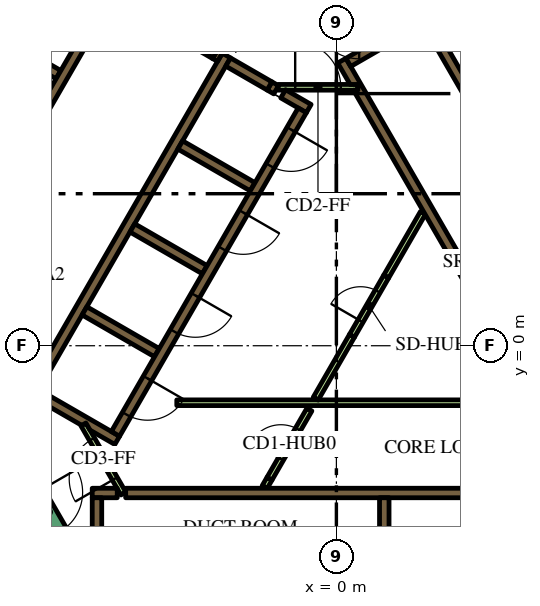
"""IFC4 building model, lengths in metres.
Left out: names, types, materials, properties, quantities, classifications, styles, units other than length and angle.
Written with IfcOpenShell. Run it as: python <this file> out.ifc"""

import sys

from ifc_helpers import new_model, si_unit, direction, frame, frame_2d, origin, place, context, subcontext, project, spatial, polyline, rectangle, outline, extrude, element, fill, save


model = new_model("IFC4")
c1 = context("Model", 3, precision=1e-05, world=origin(), true_north=direction((0.0, 1.0)))
c2 = subcontext(c1, "Body", "Model", "MODEL_VIEW")
j1 = project(units=[si_unit("LENGTHUNIT", "METRE"), si_unit("PLANEANGLEUNIT", "RADIAN")], contexts=[c1])
p1 = place(None, origin())
s1 = spatial("IfcSite", under=j1, at=p1, CompositionType="ELEMENT")
p2 = place(p1, origin())
s2 = spatial("IfcBuilding", under=s1, at=p2, CompositionType="ELEMENT")
p3 = place(p2, frame((0.0, 0.0, 99.3)))
s3 = spatial("IfcBuildingStorey", under=s2, at=p3, CompositionType="ELEMENT", Elevation=99.3)
p4 = place(p3, frame((-15.36, -1.503, 0.0), z_axis=(0.0, 0.0, 1.0), x_axis=(0.50000389221, 0.866023156604, 0.0)))
e1 = element("IfcWall", 1, at=p4, inside=s3, PredefinedType="SOLIDWALL", context=c2, shape_type="SweptSolid", body=[
    extrude(rectangle(XDim=21.0, YDim=0.9, at=frame_2d((10.5, 0.0))), origin(), (0.0, 0.0, 1.0), 3.9),
])
p5 = place(p3, frame((-5.545, -3.875, 0.0), z_axis=(0.0, 0.0, 1.0), x_axis=(1.0, 0.0, 0.0)))
e2 = element("IfcWall", 2, at=p5, inside=s3, PredefinedType="SOLIDWALL", context=c2, shape_type="SweptSolid", body=[
    extrude(rectangle(XDim=11.97, YDim=0.25, at=frame_2d((5.985, 0.0))), origin(), (0.0, 0.0, 1.0), 3.9),
])
p6 = place(p3, frame((-6.425, -3.875, 0.0), z_axis=(0.0, 0.0, 1.0), x_axis=(1.0, 0.0, 0.0)))
e3 = element("IfcWall", 3, at=p6, inside=s3, PredefinedType="SOLIDWALL", context=c2, shape_type="SweptSolid", body=[
    extrude(rectangle(XDim=0.658, YDim=0.25, at=frame_2d((0.329, 0.0))), origin(), (0.0, 0.0, 1.0), 3.9),
])
p7 = place(p3, frame((1.26, -4.0, 0.0), z_axis=(0.0, 0.0, 1.0), x_axis=(0.0, -1.0, 0.0)))
e4 = element("IfcWall", 4, at=p7, inside=s3, PredefinedType="SOLIDWALL", context=c2, shape_type="SweptSolid", body=[
    extrude(rectangle(XDim=2.2, YDim=0.25, at=frame_2d((1.1, 0.0))), origin(), (0.0, 0.0, 1.0), 3.9),
])
p8 = place(p3, frame((-6.3, -4.0, 0.0), z_axis=(0.0, 0.0, 1.0), x_axis=(0.0, -1.0, 0.0)))
e5 = element("IfcWall", 5, at=p8, inside=s3, PredefinedType="SOLIDWALL", context=c2, shape_type="SweptSolid", body=[
    extrude(rectangle(XDim=3.154, YDim=0.25, at=frame_2d((1.577, 0.0))), origin(), (0.0, 0.0, 1.0), 3.9),
])
p9 = place(p3, origin())
e6 = element("IfcWall", 6, at=p9, inside=s3, PredefinedType="SOLIDWALL", context=c2, shape_type="SweptSolid", body=[
    extrude(outline(polyline([(0.566, 6.725), (0.566, 6.875), (0.566, 6.875), (0.565, 6.875), (0.361, 6.875), (0.035, 7.439), (0.252, 7.564), (0.377, 7.348), (6.552, -3.348), (6.677, -3.564), (6.46, -3.689), (0.448, 6.725), (0.565, 6.725), (0.566, 6.725), (0.566, 6.725)])), origin(), (0.0, 0.0, 1.0), 3.9),
])
p10 = place(p3, frame((0.314, 7.456, 0.0), z_axis=(0.0, 0.0, 1.0), x_axis=(0.866013897511, 0.50001992892, 0.0)))
e7 = element("IfcWall", 7, at=p10, inside=s3, PredefinedType="SOLIDWALL", context=c2, shape_type="SweptSolid", body=[
    extrude(rectangle(XDim=3.268, YDim=0.25, at=frame_2d((1.634, 0.0))), origin(), (0.0, 0.0, 1.0), 3.9),
])
p11 = place(p3, frame((-8.06, -1.311, 0.0), z_axis=(0.0, 0.0, 1.0), x_axis=(0.50000273126, 0.866023826885, 0.0)))
e8 = element("IfcWall", 8, at=p11, inside=s3, PredefinedType="SOLIDWALL", context=c2, shape_type="SweptSolid", body=[
    extrude(rectangle(XDim=10.33, YDim=0.25, at=frame_2d((5.165, 0.0))), origin(), (0.0, 0.0, 1.0), 3.9),
])
p12 = place(p3, frame((-1.758, 6.835, 0.0), z_axis=(0.0, 0.0, 1.0), x_axis=(0.865982457891, -0.500074377092, 0.0)))
e9 = element("IfcWall", 9, at=p12, inside=s3, PredefinedType="SOLIDWALL", context=c2, shape_type="SweptSolid", body=[
    extrude(rectangle(XDim=0.2, YDim=0.25, at=frame_2d((0.1, 0.0))), origin(), (0.0, 0.0, 1.0), 3.9),
])
p13 = place(p3, frame((-1.76, 6.836, 0.0), z_axis=(0.0, 0.0, 1.0), x_axis=(-0.865952863304, 0.500125622755, 0.0)))
e10 = element("IfcWall", 10, at=p13, inside=s3, PredefinedType="SOLIDWALL", context=c2, shape_type="SweptSolid", body=[
    extrude(rectangle(XDim=1.258, YDim=0.25, at=frame_2d((0.629, 0.0))), origin(), (0.0, 0.0, 1.0), 3.9),
])
p14 = place(p3, frame((-0.728, 6.24, 0.0), z_axis=(0.0, 0.0, 1.0), x_axis=(-0.865955664968, 0.500120771724, 0.0)))
e11 = element("IfcWall", 11, at=p14, inside=s3, PredefinedType="SOLIDWALL", context=c2, shape_type="SweptSolid", body=[
    extrude(rectangle(XDim=0.778, YDim=0.25, at=frame_2d((0.389, 0.0))), origin(), (0.0, 0.0, 1.0), 3.9),
])
for number, where, z_axis, x_axis in (
    (12, (-2.204, 4.182, 0.0), (0.0, 0.0, 1.0), (-0.866, 0.5, 0.0)),
    (13, (-5.369, 3.1, 0.0), (0.0, 0.0, 1.0), (0.866, -0.5, 0.0)),
    (14, (-4.724, -0.182, 0.0), (0.0, 0.0, 1.0), (-0.866, 0.5, 0.0)),
):
    element("IfcWall", number, at=place(p3, frame(where, z_axis=z_axis, x_axis=x_axis)), inside=s3, PredefinedType="SOLIDWALL", context=c2, shape_type="SweptSolid", body=[
        extrude(rectangle(XDim=2.2, YDim=0.25, at=frame_2d((1.1, 0.0))), origin(), (0.0, 0.0, 1.0), 3.9),
    ])
e15 = element("IfcWall", 15, at=p9, inside=s3, PredefinedType="SOLIDWALL", context=c2, shape_type="SweptSolid", body=[
    extrude(outline(polyline([(-5.922, -2.257), (-5.922, -2.257), (-5.705, -2.382), (-5.83, -2.598), (-6.483, -2.221), (-6.591, -2.033), (-6.591, -2.033), (-6.7, -2.096), (-7.952, -1.373), (-7.827, -1.156), (-5.922, -2.257)])), origin(), (0.0, 0.0, 1.0), 3.9),
])
e16 = element("IfcWall", 16, at=p9, inside=s3, PredefinedType="SOLIDWALL", context=c2, shape_type="SweptSolid", body=[
    extrude(outline(polyline([(-3.128, 7.481), (-3.259, 7.557), (-3.134, 7.773), (-3.003, 7.698), (-3.128, 7.481)])), origin(), (0.0, 0.0, 1.0), 3.9),
])
p15 = place(p3, frame((-7.314, 7.132, 0.0), z_axis=(0.0, 0.0, 1.0), x_axis=(-0.866008176907, 0.50002983664, 0.0)))
e17 = element("IfcWall", 17, at=p15, inside=s3, PredefinedType="SOLIDWALL", context=c2, shape_type="SweptSolid", body=[
    extrude(rectangle(XDim=2.2, YDim=0.25, at=frame_2d((1.1, 0.0))), origin(), (0.0, 0.0, 1.0), 3.9),
])
p16 = place(p3, frame((-1.887, -3.718, 0.0), z_axis=(0.0, 0.0, 1.0), x_axis=(0.500165633897, 0.865929753888, 0.0)))
e18 = element("IfcWall", 18, at=p16, inside=s3, PredefinedType="PARTITIONING", context=c2, shape_type="SweptSolid", body=[
    extrude(rectangle(XDim=0.254, YDim=0.15, at=frame_2d((0.127, 0.0))), origin(), (0.0, 0.0, 1.0), 2.75),
])
p17 = place(p3, frame((-4.2, -1.5, 0.0), z_axis=(0.0, 0.0, 1.0), x_axis=(1.0, 0.0, 0.0)))
e19 = element("IfcWall", 19, at=p17, inside=s3, PredefinedType="PARTITIONING", context=c2, shape_type="SweptSolid", body=[
    extrude(rectangle(XDim=9.359, YDim=0.15, at=frame_2d((4.68, 0.0))), origin(), (0.0, 0.0, 1.0), 2.75),
])
p18 = place(p3, frame((-0.544, -1.393, 0.0), z_axis=(0.0, 0.0, 1.0), x_axis=(0.499928740635, 0.866066541489, 0.0)))
e20 = element("IfcWall", 20, at=p18, inside=s3, PredefinedType="PARTITIONING", context=c2, shape_type="SweptSolid", body=[
    extrude(rectangle(XDim=1.912, YDim=0.15, at=frame_2d((0.956, 0.0))), origin(), (0.0, 0.0, 1.0), 2.75),
])
p19 = place(p3, frame((1.312, 1.822, 0.0), z_axis=(0.0, 0.0, 1.0), x_axis=(0.500003549559, 0.866023354436, 0.0)))
e21 = element("IfcWall", 21, at=p19, inside=s3, PredefinedType="PARTITIONING", context=c2, shape_type="SweptSolid", body=[
    extrude(rectangle(XDim=1.93, YDim=0.15, at=frame_2d((0.965, 0.0))), origin(), (0.0, 0.0, 1.0), 2.75),
])
p20 = place(p3, frame((8.565, -2.185, 0.0), z_axis=(0.0, 0.0, 1.0), x_axis=(-0.499997954832, 0.866026584559, 0.0)))
e22 = element("IfcWall", 22, at=p20, inside=s3, PredefinedType="SOLIDWALL", context=c2, shape_type="SweptSolid", body=[
    extrude(rectangle(XDim=12.35, YDim=0.25, at=frame_2d((6.175, 0.0))), origin(), (0.0, 0.0, 1.0), 3.9),
])
p21 = place(p20, frame((5.725, 0.0, 0.0)))
e23 = element("IfcOpeningElement", 23, at=p21, cuts=e22, PredefinedType="OPENING", context=c2, shape_type="SweptSolid", body=[
    extrude(rectangle(XDim=0.9, YDim=2.1, at=frame_2d((0.45, 1.05))), frame((0.0, 0.135, 0.0), z_axis=(0.0, -1.0, 0.0), x_axis=(1.0, 0.0, 0.0)), (0.0, 0.0, 1.0), 0.27),
])
p22 = place(p3, frame((-6.008, 9.144, 0.0), z_axis=(0.0, 0.0, 1.0), x_axis=(-0.500006956611, -0.866021387346, 0.0)))
e24 = element("IfcWall", 24, at=p22, inside=s3, PredefinedType="SOLIDWALL", context=c2, shape_type="SweptSolid", body=[
    extrude(rectangle(XDim=9.83, YDim=0.25, at=frame_2d((4.915, 0.0))), origin(), (0.0, 0.0, 1.0), 3.9),
])
p23 = place(p22, frame((6.985, 0.0, 0.0)))
e25 = element("IfcOpeningElement", 25, at=p23, cuts=e24, PredefinedType="OPENING", context=c2, shape_type="SweptSolid", body=[
    extrude(rectangle(XDim=0.9, YDim=2.1, at=frame_2d((0.45, 1.05))), frame((0.0, 0.135, 0.0), z_axis=(0.0, -1.0, 0.0), x_axis=(1.0, 0.0, 0.0)), (0.0, 0.0, 1.0), 0.27),
])
p24 = place(p3, frame((-0.898, 6.194, 0.0), z_axis=(0.0, 0.0, 1.0), x_axis=(-0.499996202215, -0.866027596426, 0.0)))
e26 = element("IfcWall", 26, at=p24, inside=s3, PredefinedType="SOLIDWALL", context=c2, shape_type="SweptSolid", body=[
    extrude(rectangle(XDim=9.83, YDim=0.25, at=frame_2d((4.915, 0.0))), origin(), (0.0, 0.0, 1.0), 3.9),
])
p25 = place(p24, frame((0.585, 0.0, 0.0)))
e27 = element("IfcOpeningElement", 27, at=p25, cuts=e26, PredefinedType="OPENING", context=c2, shape_type="SweptSolid", body=[
    extrude(rectangle(XDim=1.1, YDim=2.1, at=frame_2d((0.55, 1.05))), frame((0.0, 0.135, 0.0), z_axis=(0.0, -1.0, 0.0), x_axis=(1.0, 0.0, 0.0)), (0.0, 0.0, 1.0), 0.27),
])
p26 = place(p24, frame((3.105, 0.0, 0.0)))
e28 = element("IfcOpeningElement", 28, at=p26, cuts=e26, PredefinedType="OPENING", context=c2, shape_type="SweptSolid", body=[
    extrude(rectangle(XDim=1.1, YDim=2.1, at=frame_2d((0.55, 1.05))), frame((0.0, 0.135, 0.0), z_axis=(0.0, -1.0, 0.0), x_axis=(1.0, 0.0, 0.0)), (0.0, 0.0, 1.0), 0.27),
])
p27 = place(p24, frame((5.625, 0.0, 0.0)))
e29 = element("IfcOpeningElement", 29, at=p27, cuts=e26, PredefinedType="OPENING", context=c2, shape_type="SweptSolid", body=[
    extrude(rectangle(XDim=1.1, YDim=2.1, at=frame_2d((0.55, 1.05))), frame((0.0, 0.135, 0.0), z_axis=(0.0, -1.0, 0.0), x_axis=(1.0, 0.0, 0.0)), (0.0, 0.0, 1.0), 0.27),
])
p28 = place(p24, frame((8.145, 0.0, 0.0)))
e30 = element("IfcOpeningElement", 30, at=p28, cuts=e26, PredefinedType="OPENING", context=c2, shape_type="SweptSolid", body=[
    extrude(rectangle(XDim=1.1, YDim=2.1, at=frame_2d((0.55, 1.05))), frame((0.0, 0.135, 0.0), z_axis=(0.0, -1.0, 0.0), x_axis=(1.0, 0.0, 0.0)), (0.0, 0.0, 1.0), 0.27),
])
p29 = place(p3, frame((-8.103, -3.466, 0.0), z_axis=(0.0, 0.0, 1.0), x_axis=(0.500078061341, -0.865980330357, 0.0)))
e31 = element("IfcWall", 31, at=p29, inside=s3, PredefinedType="SOLIDWALL", context=c2, shape_type="SweptSolid", body=[
    extrude(rectangle(XDim=2.1, YDim=0.4, at=frame_2d((1.05, 0.0))), origin(), (0.0, 0.0, 1.0), 3.9),
])
p30 = place(p29, frame((0.45, 0.0, 0.0)))
e32 = element("IfcOpeningElement", 32, at=p30, cuts=e31, PredefinedType="OPENING", context=c2, shape_type="SweptSolid", body=[
    extrude(rectangle(XDim=1.2, YDim=2.1, at=frame_2d((0.6, 1.05))), frame((0.0, 0.21, 0.0), z_axis=(0.0, -1.0, 0.0), x_axis=(1.0, 0.0, 0.0)), (0.0, 0.0, 1.0), 0.42),
])
p31 = place(p3, frame((-1.76, -3.498, 0.0), z_axis=(0.0, 0.0, 1.0), x_axis=(0.499977374825, 0.866038466041, 0.0)))
e33 = element("IfcWall", 33, at=p31, inside=s3, PredefinedType="PARTITIONING", context=c2, shape_type="SweptSolid", body=[
    extrude(rectangle(XDim=2.1, YDim=0.15, at=frame_2d((1.05, 0.0))), origin(), (0.0, 0.0, 1.0), 2.75),
])
p32 = place(p31, frame((0.6, 0.0, 0.0)))
e34 = element("IfcOpeningElement", 34, at=p32, cuts=e33, PredefinedType="OPENING", context=c2, shape_type="SweptSolid", body=[
    extrude(rectangle(XDim=0.9, YDim=2.1, at=frame_2d((0.45, 1.05))), frame((0.0, 0.085, 0.0), z_axis=(0.0, -1.0, 0.0), x_axis=(1.0, 0.0, 0.0)), (0.0, 0.0, 1.0), 0.17),
])
p33 = place(p3, frame((-1.534, 6.8, 0.0), z_axis=(0.0, 0.0, 1.0), x_axis=(1.0, 0.0, 0.0)))
e35 = element("IfcWall", 35, at=p33, inside=s3, PredefinedType="PARTITIONING", context=c2, shape_type="SweptSolid", body=[
    extrude(rectangle(XDim=2.1, YDim=0.15, at=frame_2d((1.05, 0.0))), origin(), (0.0, 0.0, 1.0), 2.75),
])
p34 = place(p33, frame((0.45, 0.0, 0.0)))
e36 = element("IfcOpeningElement", 36, at=p34, cuts=e35, PredefinedType="OPENING", context=c2, shape_type="SweptSolid", body=[
    extrude(rectangle(XDim=1.2, YDim=2.1, at=frame_2d((0.6, 1.05))), frame((0.0, 0.085, 0.0), z_axis=(0.0, -1.0, 0.0), x_axis=(1.0, 0.0, 0.0)), (0.0, 0.0, 1.0), 0.17),
])
p35 = place(p3, frame((-5.606, -3.89, 0.0), z_axis=(0.0, 0.0, 1.0), x_axis=(-0.500027713859, 0.866009402589, 0.0)))
e37 = element("IfcWall", 37, at=p35, inside=s3, PredefinedType="PARTITIONING", context=c2, shape_type="SweptSolid", body=[
    extrude(rectangle(XDim=2.1, YDim=0.15, at=frame_2d((1.05, 0.0))), origin(), (0.0, 0.0, 1.0), 2.75),
])
p36 = place(p35, frame((0.45, 0.0, 0.0)))
e38 = element("IfcOpeningElement", 38, at=p36, cuts=e37, PredefinedType="OPENING", context=c2, shape_type="SweptSolid", body=[
    extrude(rectangle(XDim=1.2, YDim=2.1, at=frame_2d((0.6, 1.05))), frame((0.0, 0.085, 0.0), z_axis=(0.0, -1.0, 0.0), x_axis=(1.0, 0.0, 0.0)), (0.0, 0.0, 1.0), 0.17),
])
p37 = place(p3, frame((-4.409, 8.365, 0.0), z_axis=(0.0, 0.0, 1.0), x_axis=(0.866034573852, -0.49998411664, 0.0)))
e39 = element("IfcWall", 39, at=p37, inside=s3, PredefinedType="SOLIDWALL", context=c2, shape_type="SweptSolid", body=[
    extrude(rectangle(XDim=1.4, YDim=0.25, at=frame_2d((0.7, 0.0))), origin(), (0.0, 0.0, 1.0), 3.9),
])
p38 = place(p37, frame((0.1, 0.0, 0.0)))
e40 = element("IfcOpeningElement", 40, at=p38, cuts=e39, PredefinedType="OPENING", context=c2, shape_type="SweptSolid", body=[
    extrude(rectangle(XDim=1.2, YDim=2.1, at=frame_2d((0.6, 1.05))), frame((0.0, 0.135, 0.0), z_axis=(0.0, -1.0, 0.0), x_axis=(1.0, 0.0, 0.0)), (0.0, 0.0, 1.0), 0.27),
])
p39 = place(p3, frame((0.412, 0.263, 0.0), z_axis=(0.0, 0.0, 1.0), x_axis=(0.500062916607, 0.865989075817, 0.0)))
e41 = element("IfcWall", 41, at=p39, inside=s3, PredefinedType="PARTITIONING", context=c2, shape_type="SweptSolid", body=[
    extrude(rectangle(XDim=1.8, YDim=0.15, at=frame_2d((0.9, 0.0))), origin(), (0.0, 0.0, 1.0), 2.75),
])
p40 = place(p39, frame((0.45, 0.0, 0.0)))
e42 = element("IfcOpeningElement", 42, at=p40, cuts=e41, PredefinedType="OPENING", context=c2, shape_type="SweptSolid", body=[
    extrude(rectangle(XDim=0.9, YDim=2.1, at=frame_2d((0.45, 1.05))), frame((0.0, 0.085, 0.0), z_axis=(0.0, -1.0, 0.0), x_axis=(1.0, 0.0, 0.0)), (0.0, 0.0, 1.0), 0.17),
])
p41 = place(p3, frame((-19.081, -3.9, 0.0), z_axis=(0.0, 0.0, 1.0), x_axis=(0.499998313975, 0.866026377209, 0.0)))
e43 = element("IfcWall", 43, at=p41, inside=s3, PredefinedType="PARTITIONING", context=c2, shape_type="SweptSolid", body=[
    extrude(rectangle(XDim=25.766, YDim=0.15, at=frame_2d((12.883, 0.0))), origin(), (0.0, 0.0, 1.0), 2.75),
])
p42 = place(p41, frame((19.306, 0.0, 0.0)))
e44 = element("IfcOpeningElement", 44, at=p42, cuts=e43, PredefinedType="OPENING", context=c2, shape_type="SweptSolid", body=[
    extrude(rectangle(XDim=1.0, YDim=2.1, at=frame_2d((0.5, 1.05))), frame((0.0, 0.085, 0.0), z_axis=(0.0, -1.0, 0.0), x_axis=(1.0, 0.0, 0.0)), (0.0, 0.0, 1.0), 0.17),
])
p43 = place(p41, frame((17.144, 0.0, 0.0)))
e45 = element("IfcOpeningElement", 45, at=p43, cuts=e43, PredefinedType="OPENING", context=c2, shape_type="SweptSolid", body=[
    extrude(rectangle(XDim=0.9, YDim=2.1, at=frame_2d((0.45, 1.05))), frame((0.0, 0.085, 0.0), z_axis=(0.0, -1.0, 0.0), x_axis=(1.0, 0.0, 0.0)), (0.0, 0.0, 1.0), 0.17),
])
p44 = place(p41, frame((9.955, 0.0, 0.0)))
e46 = element("IfcOpeningElement", 46, at=p44, cuts=e43, PredefinedType="OPENING", context=c2, shape_type="SweptSolid", body=[
    extrude(rectangle(XDim=1.1, YDim=2.1, at=frame_2d((0.55, 1.05))), frame((0.0, 0.085, 0.0), z_axis=(0.0, -1.0, 0.0), x_axis=(1.0, 0.0, 0.0)), (0.0, 0.0, 1.0), 0.17),
])
p45 = place(p41, frame((8.648, 0.0, 0.0)))
e47 = element("IfcOpeningElement", 47, at=p45, cuts=e43, PredefinedType="OPENING", context=c2, shape_type="SweptSolid", body=[
    extrude(rectangle(XDim=1.0, YDim=2.1, at=frame_2d((0.5, 1.05))), frame((0.0, 0.085, 0.0), z_axis=(0.0, -1.0, 0.0), x_axis=(1.0, 0.0, 0.0)), (0.0, 0.0, 1.0), 0.17),
])
p46 = place(p41, frame((1.553, 0.0, 0.0)))
e48 = element("IfcOpeningElement", 48, at=p46, cuts=e43, PredefinedType="OPENING", context=c2, shape_type="SweptSolid", body=[
    extrude(rectangle(XDim=0.9, YDim=2.1, at=frame_2d((0.45, 1.05))), frame((0.0, 0.085, 0.0), z_axis=(0.0, -1.0, 0.0), x_axis=(1.0, 0.0, 0.0)), (0.0, 0.0, 1.0), 0.17),
])
p47 = place(p25, origin())
e49 = element("IfcDoor", 49, at=p47, inside=s3, OperationType="DOUBLE_DOOR_SLIDING", PredefinedType="DOOR", context=c2, shape_type="SweptSolid", body=[
    extrude(rectangle(XDim=1.1, YDim=2.1, at=frame_2d((0.55, 1.05))), frame((0.0, 0.025, 0.0), z_axis=(0.0, -1.0, 0.0), x_axis=(1.0, 0.0, 0.0)), (0.0, 0.0, 1.0), 0.05),
])
fill(e27, e49)
p48 = place(p26, origin())
e50 = element("IfcDoor", 50, at=p48, inside=s3, OperationType="DOUBLE_DOOR_SLIDING", PredefinedType="DOOR", context=c2, shape_type="SweptSolid", body=[
    extrude(rectangle(XDim=1.1, YDim=2.1, at=frame_2d((0.55, 1.05))), frame((0.0, 0.025, 0.0), z_axis=(0.0, -1.0, 0.0), x_axis=(1.0, 0.0, 0.0)), (0.0, 0.0, 1.0), 0.05),
])
fill(e28, e50)
p49 = place(p27, origin())
e51 = element("IfcDoor", 51, at=p49, inside=s3, OperationType="DOUBLE_DOOR_SLIDING", PredefinedType="DOOR", context=c2, shape_type="SweptSolid", body=[
    extrude(rectangle(XDim=1.1, YDim=2.1, at=frame_2d((0.55, 1.05))), frame((0.0, 0.025, 0.0), z_axis=(0.0, -1.0, 0.0), x_axis=(1.0, 0.0, 0.0)), (0.0, 0.0, 1.0), 0.05),
])
fill(e29, e51)
p50 = place(p28, origin())
e52 = element("IfcDoor", 52, at=p50, inside=s3, OperationType="DOUBLE_DOOR_SLIDING", PredefinedType="DOOR", context=c2, shape_type="SweptSolid", body=[
    extrude(rectangle(XDim=1.1, YDim=2.1, at=frame_2d((0.55, 1.05))), frame((0.0, 0.025, 0.0), z_axis=(0.0, -1.0, 0.0), x_axis=(1.0, 0.0, 0.0)), (0.0, 0.0, 1.0), 0.05),
])
fill(e30, e52)
p51 = place(p30, origin())
e53 = element("IfcDoor", 53, at=p51, inside=s3, OperationType="SINGLE_SWING_LEFT", PredefinedType="DOOR", context=c2, shape_type="SweptSolid", body=[
    extrude(rectangle(XDim=1.2, YDim=2.1, at=frame_2d((0.6, 1.05))), frame((0.0, 0.025, 0.0), z_axis=(0.0, -1.0, 0.0), x_axis=(1.0, 0.0, 0.0)), (0.0, 0.0, 1.0), 0.05),
])
fill(e32, e53)
p52 = place(p32, origin())
e54 = element("IfcDoor", 54, at=p52, inside=s3, OperationType="SINGLE_SWING_LEFT", PredefinedType="DOOR", context=c2, shape_type="SweptSolid", body=[
    extrude(rectangle(XDim=0.9, YDim=2.1, at=frame_2d((0.45, 1.05))), frame((0.0, 0.025, 0.0), z_axis=(0.0, -1.0, 0.0), x_axis=(1.0, 0.0, 0.0)), (0.0, 0.0, 1.0), 0.05),
])
fill(e34, e54)
p53 = place(p34, origin())
e55 = element("IfcDoor", 55, at=p53, inside=s3, OperationType="SINGLE_SWING_LEFT", PredefinedType="DOOR", context=c2, shape_type="SweptSolid", body=[
    extrude(rectangle(XDim=1.2, YDim=2.1, at=frame_2d((0.6, 1.05))), frame((0.0, 0.025, 0.0), z_axis=(0.0, -1.0, 0.0), x_axis=(1.0, 0.0, 0.0)), (0.0, 0.0, 1.0), 0.05),
])
fill(e36, e55)
p54 = place(p36, origin())
e56 = element("IfcDoor", 56, at=p54, inside=s3, OperationType="SINGLE_SWING_LEFT", PredefinedType="DOOR", context=c2, shape_type="SweptSolid", body=[
    extrude(rectangle(XDim=1.2, YDim=2.1, at=frame_2d((0.6, 1.05))), frame((0.0, 0.025, 0.0), z_axis=(0.0, -1.0, 0.0), x_axis=(1.0, 0.0, 0.0)), (0.0, 0.0, 1.0), 0.05),
])
fill(e38, e56)
p55 = place(p38, origin())
e57 = element("IfcDoor", 57, at=p55, inside=s3, OperationType="SINGLE_SWING_LEFT", PredefinedType="DOOR", context=c2, shape_type="SweptSolid", body=[
    extrude(rectangle(XDim=1.2, YDim=2.1, at=frame_2d((0.6, 1.05))), frame((0.0, 0.025, 0.0), z_axis=(0.0, -1.0, 0.0), x_axis=(1.0, 0.0, 0.0)), (0.0, 0.0, 1.0), 0.05),
])
fill(e40, e57)
p56 = place(p40, origin())
e58 = element("IfcDoor", 58, at=p56, inside=s3, OperationType="SINGLE_SWING_LEFT", PredefinedType="DOOR", context=c2, shape_type="SweptSolid", body=[
    extrude(rectangle(XDim=0.9, YDim=2.1, at=frame_2d((0.45, 1.05))), frame((0.0, 0.025, 0.0), z_axis=(0.0, -1.0, 0.0), x_axis=(1.0, 0.0, 0.0)), (0.0, 0.0, 1.0), 0.05),
])
fill(e42, e58)
save(model, sys.argv[1])
